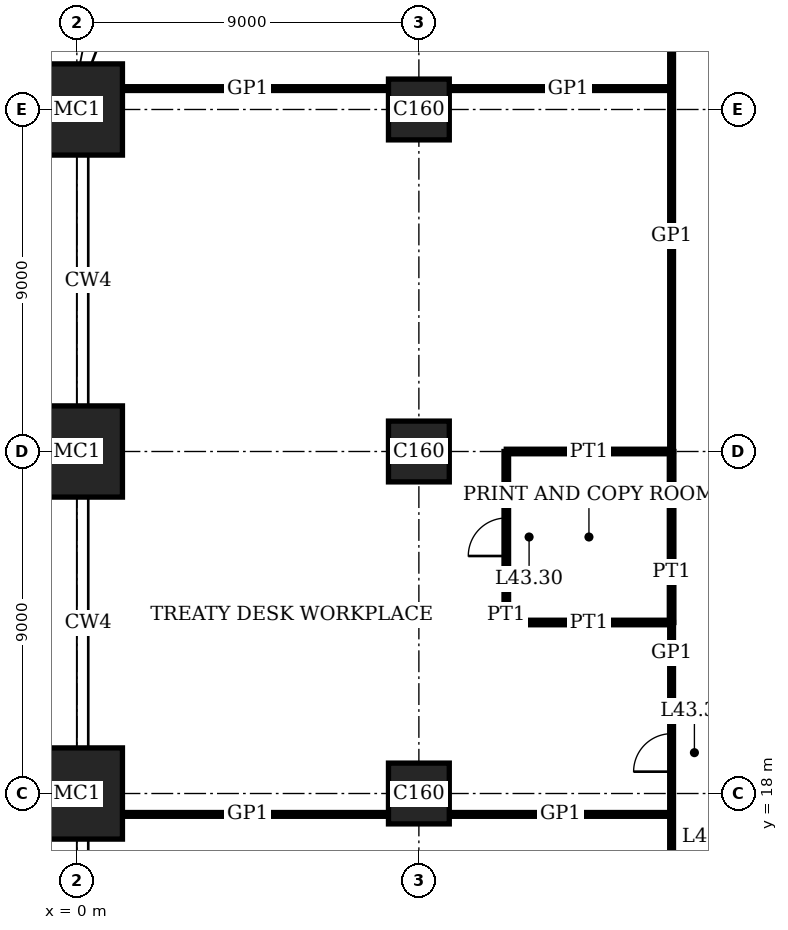
"""IFC4 building model, lengths in metres.
Left out: names, types, materials, properties, quantities, classifications, styles, units other than length and angle.
Written with IfcOpenShell. Run it as: python <this file> out.ifc"""

import sys

from ifc_helpers import new_model, si_unit, direction, frame, frame_2d, origin, origin_2d, place, context, subcontext, project, spatial, rectangle, extrude, element, fill, save


model = new_model("IFC4")
c1 = context("Model", 3, precision=1e-05, world=origin(), true_north=direction((0.0, 1.0)))
c2 = subcontext(c1, "Body", "Model", "MODEL_VIEW")
j1 = project(units=[si_unit("LENGTHUNIT", "METRE"), si_unit("PLANEANGLEUNIT", "RADIAN")], contexts=[c1])
p1 = place(None, origin())
s1 = spatial("IfcSite", under=j1, at=p1, CompositionType="ELEMENT")
p2 = place(p1, origin())
s2 = spatial("IfcBuilding", under=s1, at=p2, CompositionType="ELEMENT")
p3 = place(p2, frame((0.0, 0.0, 178.2)))
s3 = spatial("IfcBuildingStorey", under=s2, at=p3, CompositionType="ELEMENT", Elevation=178.2)
for number, where, z_axis, x_axis in (
    (1, (0.0, 18.0, 0.0), (0.0, 0.0, 1.0), (1.0, 0.0, 0.0)),
    (2, (0.0, 27.0, 0.0), (0.0, 0.0, 1.0), (1.0, 0.0, 0.0)),
    (3, (0.0, 36.0, 0.0), (0.0, 0.0, 1.0), (1.0, 0.0, 0.0)),
):
    element("IfcColumn", number, at=place(p3, frame(where, z_axis=z_axis, x_axis=x_axis)), inside=s3, PredefinedType="COLUMN", context=c2, shape_type="SweptSolid", body=[
        extrude(rectangle(XDim=2.4, YDim=2.4, at=origin_2d()), origin(), (0.0, 0.0, 1.0), 4.0),
    ])
for number, where, z_axis, x_axis in (
    (4, (9.0, 18.0, 0.0), (0.0, 0.0, 1.0), (1.0, 0.0, 0.0)),
    (5, (9.0, 27.0, 0.0), (0.0, 0.0, 1.0), (1.0, 0.0, 0.0)),
    (6, (9.0, 36.0, 0.0), (0.0, 0.0, 1.0), (1.0, 0.0, 0.0)),
):
    element("IfcColumn", number, at=place(p3, frame(where, z_axis=z_axis, x_axis=x_axis)), inside=s3, PredefinedType="COLUMN", context=c2, shape_type="SweptSolid", body=[
        extrude(rectangle(XDim=1.6, YDim=1.6, at=origin_2d()), origin(), (0.0, 0.0, 1.0), 4.0),
    ])
p4 = place(p3, frame((1.2, 17.45, 0.0), z_axis=(0.0, 0.0, 1.0), x_axis=(1.0, 0.0, 0.0)))
e7 = element("IfcWall", 7, at=p4, inside=s3, PredefinedType="PARTITIONING", context=c2, shape_type="SweptSolid", body=[
    extrude(rectangle(XDim=7.0, YDim=0.1, at=frame_2d((3.5, 0.0))), origin(), (0.0, 0.0, 1.0), 3.75),
])
p5 = place(p3, frame((9.8, 17.45, 0.0), z_axis=(0.0, 0.0, 1.0), x_axis=(1.0, 0.0, 0.0)))
e8 = element("IfcWall", 8, at=p5, inside=s3, PredefinedType="PARTITIONING", context=c2, shape_type="SweptSolid", body=[
    extrude(rectangle(XDim=5.85, YDim=0.1, at=frame_2d((2.925, 0.0))), origin(), (0.0, 0.0, 1.0), 3.75),
])
p6 = place(p3, frame((11.3, 22.5, 0.0), z_axis=(0.0, 0.0, 1.0), x_axis=(1.0, 0.0, 0.0)))
e9 = element("IfcWall", 9, at=p6, inside=s3, PredefinedType="PARTITIONING", context=c2, shape_type="SweptSolid", body=[
    extrude(rectangle(XDim=4.35, YDim=0.12, at=frame_2d((2.175, 0.0))), origin(), (0.0, 0.0, 1.0), 3.1),
])
p7 = place(p3, frame((11.3, 27.0, 0.0), z_axis=(0.0, 0.0, 1.0), x_axis=(1.0, 0.0, 0.0)))
e10 = element("IfcWall", 10, at=p7, inside=s3, PredefinedType="PARTITIONING", context=c2, shape_type="SweptSolid", body=[
    extrude(rectangle(XDim=4.35, YDim=0.12, at=frame_2d((2.175, 0.0))), origin(), (0.0, 0.0, 1.0), 3.05),
])
p8 = place(p3, frame((1.2, 36.55, 0.0), z_axis=(0.0, 0.0, 1.0), x_axis=(1.0, 0.0, 0.0)))
e11 = element("IfcWall", 11, at=p8, inside=s3, PredefinedType="PARTITIONING", context=c2, shape_type="SweptSolid", body=[
    extrude(rectangle(XDim=7.0, YDim=0.1, at=frame_2d((3.5, 0.0))), origin(), (0.0, 0.0, 1.0), 3.75),
])
p9 = place(p3, frame((9.8, 36.55, 0.0), z_axis=(0.0, 0.0, 1.0), x_axis=(1.0, 0.0, 0.0)))
e12 = element("IfcWall", 12, at=p9, inside=s3, PredefinedType="PARTITIONING", context=c2, shape_type="SweptSolid", body=[
    extrude(rectangle(XDim=5.85, YDim=0.1, at=frame_2d((2.925, 0.0))), origin(), (0.0, 0.0, 1.0), 3.75),
])
p10 = place(p3, frame((11.3, 22.5, 0.0), z_axis=(0.0, 0.0, 1.0), x_axis=(0.0, 1.0, 0.0)))
e13 = element("IfcWall", 13, at=p10, inside=s3, PredefinedType="PARTITIONING", context=c2, shape_type="SweptSolid", body=[
    extrude(rectangle(XDim=4.5, YDim=0.12, at=frame_2d((2.25, 0.0))), origin(), (0.0, 0.0, 1.0), 3.75),
])
p11 = place(p10, frame((1.75, 0.0, 0.0)))
e14 = element("IfcOpeningElement", 14, at=p11, cuts=e13, PredefinedType="OPENING", context=c2, shape_type="SweptSolid", body=[
    extrude(rectangle(XDim=1.0, YDim=2.4, at=frame_2d((0.5, 1.2))), frame((0.0, 0.07, 0.0), z_axis=(0.0, -1.0, 0.0), x_axis=(1.0, 0.0, 0.0)), (0.0, 0.0, 1.0), 0.14),
])
p12 = place(p3, frame((15.65, 22.5, 0.0), z_axis=(0.0, 0.0, 1.0), x_axis=(0.0, 1.0, 0.0)))
e15 = element("IfcWall", 15, at=p12, inside=s3, PredefinedType="PARTITIONING", context=c2, shape_type="SweptSolid", body=[
    extrude(rectangle(XDim=4.5, YDim=0.12, at=frame_2d((2.25, 0.0))), origin(), (0.0, 0.0, 1.0), 3.75),
])
p13 = place(p3, frame((15.65, 15.65, 0.0), z_axis=(0.0, 0.0, 1.0), x_axis=(0.0, 1.0, 0.0)))
e16 = element("IfcWall", 16, at=p13, inside=s3, PredefinedType="PARTITIONING", context=c2, shape_type="SweptSolid", body=[
    extrude(rectangle(XDim=6.85, YDim=0.1, at=frame_2d((3.425, 0.0))), origin(), (0.0, 0.0, 1.0), 3.75),
])
p14 = place(p13, frame((2.925, 0.0, 0.0)))
e17 = element("IfcOpeningElement", 17, at=p14, cuts=e16, PredefinedType="OPENING", context=c2, shape_type="SweptSolid", body=[
    extrude(rectangle(XDim=1.0, YDim=2.4, at=frame_2d((0.5, 1.2))), frame((0.0, 0.06, 0.0), z_axis=(0.0, -1.0, 0.0), x_axis=(1.0, 0.0, 0.0)), (0.0, 0.0, 1.0), 0.12),
])
p15 = place(p3, frame((15.65, 27.0, 0.0), z_axis=(0.0, 0.0, 1.0), x_axis=(0.0, 1.0, 0.0)))
e18 = element("IfcWall", 18, at=p15, inside=s3, PredefinedType="PARTITIONING", context=c2, shape_type="SweptSolid", body=[
    extrude(rectangle(XDim=11.35, YDim=0.1, at=frame_2d((5.675, 0.0))), origin(), (0.0, 0.0, 1.0), 3.75),
])
p16 = place(p11, origin())
e19 = element("IfcDoor", 19, at=p16, inside=s3, OperationType="SINGLE_SWING_RIGHT", PredefinedType="DOOR", context=c2, shape_type="SweptSolid", body=[
    extrude(rectangle(XDim=1.0, YDim=2.4, at=frame_2d((0.5, 1.2))), frame((0.0, 0.025, 0.0), z_axis=(0.0, -1.0, 0.0), x_axis=(1.0, 0.0, 0.0)), (0.0, 0.0, 1.0), 0.05),
])
fill(e14, e19)
p17 = place(p14, origin())
e20 = element("IfcDoor", 20, at=p17, inside=s3, OperationType="SINGLE_SWING_RIGHT", PredefinedType="DOOR", context=c2, shape_type="SweptSolid", body=[
    extrude(rectangle(XDim=1.0, YDim=2.4, at=frame_2d((0.5, 1.2))), frame((0.0, 0.02, 0.0), z_axis=(0.0, -1.0, 0.0), x_axis=(1.0, 0.0, 0.0)), (0.0, 0.0, 1.0), 0.04),
])
fill(e17, e20)
save(model, sys.argv[1])
